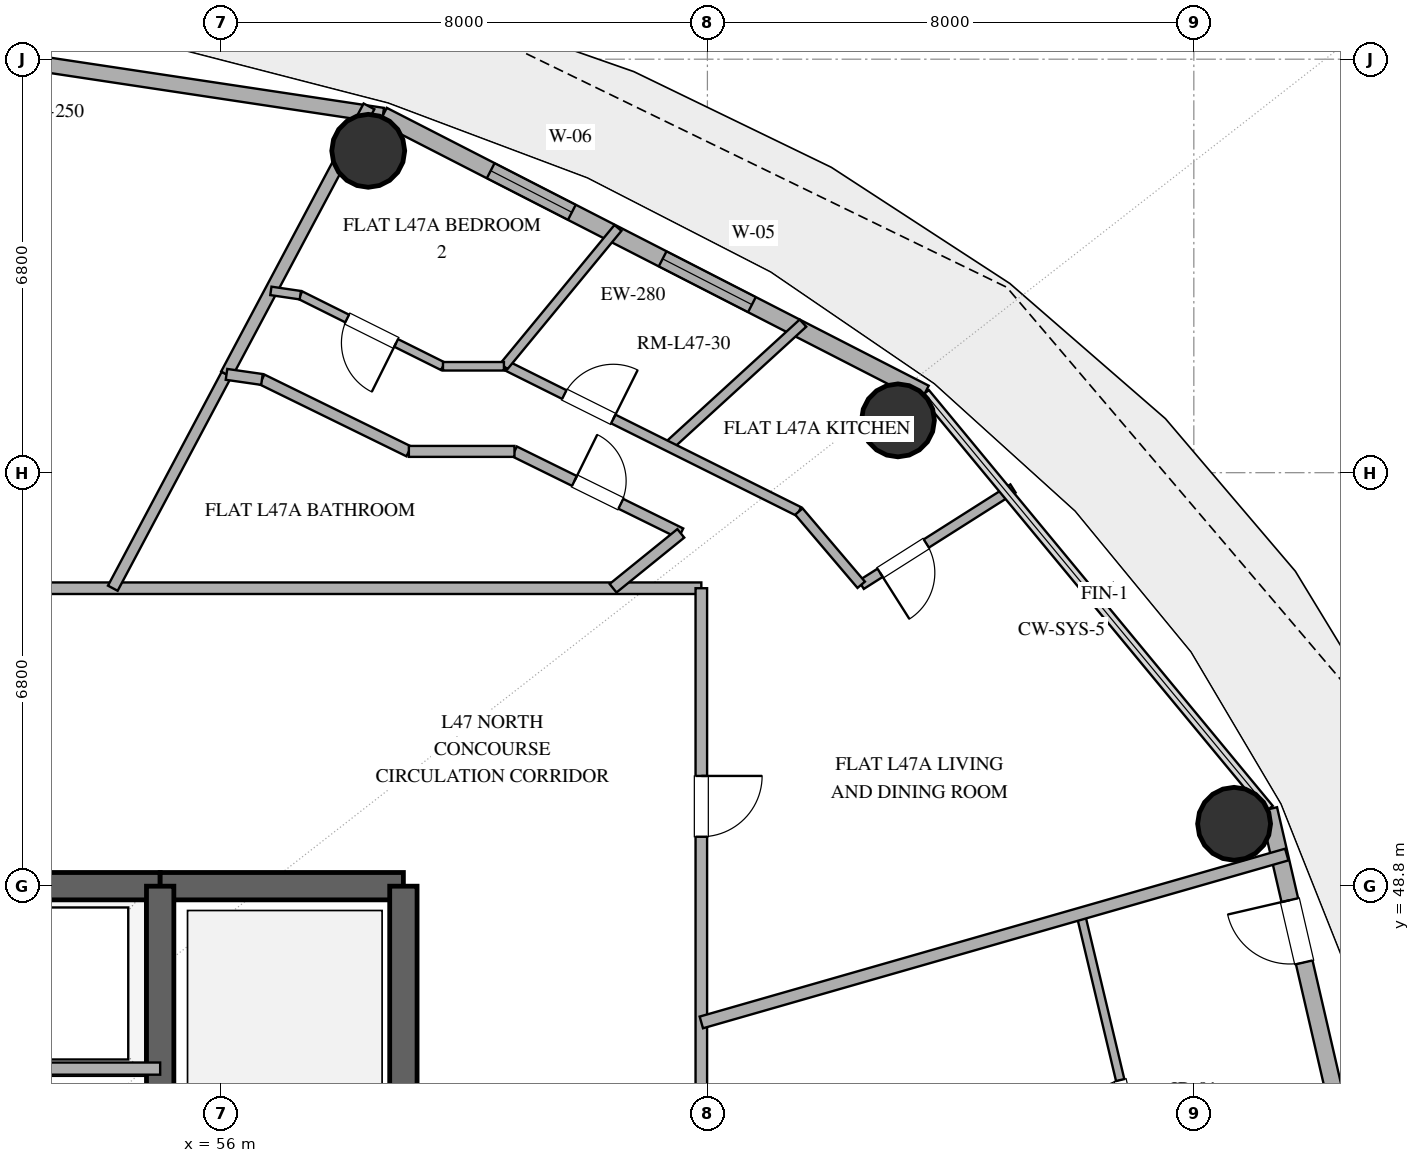
"""IFC4 building model, lengths in metres.
Left out: names, types, materials, properties, quantities, classifications, styles, units other than length and angle.
Written with IfcOpenShell. Run it as: python <this file> out.ifc"""

import sys

from ifc_helpers import new_model, si_unit, direction, frame, frame_2d, origin, origin_2d, place, context, subcontext, project, spatial, rectangle, hollow_circle, extrude, element, fill, save


model = new_model("IFC4")
c1 = context("Model", 3, precision=1e-05, world=origin(), true_north=direction((0.0, 1.0)))
c2 = subcontext(c1, "Body", "Model", "MODEL_VIEW")
j1 = project(units=[si_unit("LENGTHUNIT", "METRE"), si_unit("PLANEANGLEUNIT", "RADIAN")], contexts=[c1])
p1 = place(None, origin())
s1 = spatial("IfcSite", under=j1, at=p1, CompositionType="ELEMENT")
p2 = place(p1, origin())
s2 = spatial("IfcBuilding", under=s1, at=p2, CompositionType="ELEMENT")
p3 = place(p2, frame((0.0, 0.0, 186.6)))
s3 = spatial("IfcBuildingStorey", under=s2, at=p3, CompositionType="ELEMENT", Elevation=186.6)
p4 = place(p3, frame((41.0, 48.8, 0.0), z_axis=(0.0, 0.0, 1.0), x_axis=(1.0, 0.0, 0.0)))
e1 = element("IfcWall", 1, at=p4, inside=s3, PredefinedType="SHEAR", context=c2, shape_type="SweptSolid", body=[
    extrude(rectangle(XDim=14.0, YDim=0.45, at=frame_2d((7.0, 0.0))), origin(), (0.0, 0.0, 1.0), 3.38),
])
p5 = place(p4, frame((6.1, 0.0, 0.0)))
e2 = element("IfcOpeningElement", 2, at=p5, cuts=e1, PredefinedType="OPENING", context=c2, shape_type="SweptSolid", body=[
    extrude(rectangle(XDim=1.8, YDim=2.25, at=frame_2d((0.9, 1.125))), frame((0.0, 0.235, 0.0), z_axis=(0.0, -1.0, 0.0), x_axis=(1.0, 0.0, 0.0)), (0.0, 0.0, 1.0), 0.47),
])
p6 = place(p3, frame((55.0, 48.8, 0.0), z_axis=(0.0, 0.0, 1.0), x_axis=(1.0, 0.0, 0.0)))
e3 = element("IfcWall", 3, at=p6, inside=s3, PredefinedType="SHEAR", context=c2, shape_type="SweptSolid", body=[
    extrude(rectangle(XDim=4.0, YDim=0.45, at=frame_2d((2.0, 0.0))), origin(), (0.0, 0.0, 1.0), 3.38),
])
p7 = place(p3, frame((59.0, 35.2, 0.0), z_axis=(0.0, 0.0, 1.0), x_axis=(0.0, 1.0, 0.0)))
e4 = element("IfcWall", 4, at=p7, inside=s3, PredefinedType="SHEAR", context=c2, shape_type="SweptSolid", body=[
    extrude(rectangle(XDim=13.6, YDim=0.45, at=frame_2d((6.8, 0.0))), origin(), (0.0, 0.0, 1.0), 3.38),
])
p8 = place(p3, frame((55.0, 35.2, 0.0), z_axis=(0.0, 0.0, 1.0), x_axis=(0.0, 1.0, 0.0)))
e5 = element("IfcWall", 5, at=p8, inside=s3, PredefinedType="SHEAR", context=c2, shape_type="SweptSolid", body=[
    extrude(rectangle(XDim=13.6, YDim=0.45, at=frame_2d((6.8, 0.0))), origin(), (0.0, 0.0, 1.0), 3.38),
])
p9 = place(p8, frame((1.15, 0.0, 0.0)))
e6 = element("IfcOpeningElement", 6, at=p9, cuts=e5, PredefinedType="OPENING", context=c2, shape_type="SweptSolid", body=[
    extrude(rectangle(XDim=1.1, YDim=2.2, at=frame_2d((0.55, 1.1))), frame((0.0, 0.235, 0.0), z_axis=(0.0, -1.0, 0.0), x_axis=(1.0, 0.0, 0.0)), (0.0, 0.0, 1.0), 0.47),
])
for number, where, z_axis, x_axis in (
    (7, (72.662, 49.826, 0.0), (0.0, 0.0, 1.0), (1.0, 0.0, 0.0)),
    (8, (67.134, 56.46, 0.0), (0.0, 0.0, 1.0), (1.0, 0.0, 0.0)),
    (9, (58.422, 60.893, 0.0), (0.0, 0.0, 1.0), (1.0, 0.0, 0.0)),
):
    element("IfcColumn", number, at=place(p3, frame(where, z_axis=z_axis, x_axis=x_axis)), inside=s3, PredefinedType="COLUMN", context=c2, shape_type="SweptSolid", body=[
        extrude(hollow_circle(Radius=0.6, WallThickness=0.032, at=origin_2d()), origin(), (0.0, 0.0, 1.0), 3.38),
    ])
p10 = place(p3, frame((75.099, 42.0, 0.0), z_axis=(0.0, 0.0, 1.0), x_axis=(-0.225473184558, 0.974249374157, 0.0)))
e10 = element("IfcWall", 10, at=p10, inside=s3, PredefinedType="SOLIDWALL", context=c2, shape_type="SweptSolid", body=[
    extrude(rectangle(XDim=8.28, YDim=0.28, at=frame_2d((4.14, 0.0))), origin(), (0.0, 0.0, 1.0), 3.38),
])
p11 = place(p10, frame((5.694, 0.0, 0.0)))
e11 = element("IfcOpeningElement", 11, at=p11, cuts=e10, PredefinedType="OPENING", context=c2, shape_type="SweptSolid", body=[
    extrude(rectangle(XDim=1.05, YDim=2.2, at=frame_2d((0.525, 1.1))), frame((0.0, 0.15, 0.0), z_axis=(0.0, -1.0, 0.0), x_axis=(1.0, 0.0, 0.0)), (0.0, 0.0, 1.0), 0.3),
])
p12 = place(p3, frame((67.576, 56.906, 0.0), z_axis=(0.0, 0.0, 1.0), x_axis=(-0.889872523182, 0.456209263919, 0.0)))
e12 = element("IfcWall", 12, at=p12, inside=s3, PredefinedType="SOLIDWALL", context=c2, shape_type="SweptSolid", body=[
    extrude(rectangle(XDim=10.016, YDim=0.28, at=frame_2d((5.008, 0.0))), origin(), (0.0, 0.0, 1.0), 3.38),
])
p13 = place(p12, frame((3.196, 0.0, 0.85)))
e13 = element("IfcOpeningElement", 13, at=p13, cuts=e12, PredefinedType="OPENING", context=c2, shape_type="SweptSolid", body=[
    extrude(rectangle(XDim=1.65, YDim=2.0, at=frame_2d((0.825, 1.0))), frame((0.0, 0.15, 0.0), z_axis=(0.0, -1.0, 0.0), x_axis=(1.0, 0.0, 0.0)), (0.0, 0.0, 1.0), 0.3),
])
p14 = place(p12, frame((6.524, 0.0, 0.85)))
e14 = element("IfcOpeningElement", 14, at=p14, cuts=e12, PredefinedType="OPENING", context=c2, shape_type="SweptSolid", body=[
    extrude(rectangle(XDim=1.5, YDim=2.0, at=frame_2d((0.75, 1.0))), frame((0.0, 0.15, 0.0), z_axis=(0.0, -1.0, 0.0), x_axis=(1.0, 0.0, 0.0)), (0.0, 0.0, 1.0), 0.3),
])
p15 = place(p3, frame((58.663, 61.475, 0.0), z_axis=(0.0, 0.0, 1.0), x_axis=(-0.988863993413, 0.148822049884, 0.0)))
e15 = element("IfcWall", 15, at=p15, inside=s3, PredefinedType="SOLIDWALL", context=c2, shape_type="SweptSolid", body=[
    extrude(rectangle(XDim=10.783, YDim=0.25, at=frame_2d((5.392, 0.0))), origin(), (0.0, 0.0, 1.0), 3.38),
])
p16 = place(p3, frame((52.05, 45.8, 0.0), z_axis=(0.0, 0.0, 1.0), x_axis=(1.0, 0.0, 0.0)))
e16 = element("IfcWall", 16, at=p16, inside=s3, PredefinedType="SOLIDWALL", context=c2, shape_type="SweptSolid", body=[
    extrude(rectangle(XDim=2.95, YDim=0.2, at=frame_2d((1.475, 0.0))), origin(), (0.0, 0.0, 1.0), 2.74),
])
p17 = place(p3, frame((45.05, 53.7, 0.0), z_axis=(0.0, 0.0, 1.0), x_axis=(1.0, 0.0, 0.0)))
e17 = element("IfcWall", 17, at=p17, inside=s3, PredefinedType="PARTITIONING", context=c2, shape_type="SweptSolid", body=[
    extrude(rectangle(XDim=18.85, YDim=0.19, at=frame_2d((9.425, 0.0))), origin(), (0.0, 0.0, 1.0), 2.74),
])
p18 = place(p17, frame((4.104, 0.0, 0.0)))
e18 = element("IfcOpeningElement", 18, at=p18, cuts=e17, PredefinedType="OPENING", context=c2, shape_type="SweptSolid", body=[
    extrude(rectangle(XDim=1.0, YDim=2.2, at=frame_2d((0.5, 1.1))), frame((0.0, 0.105, 0.0), z_axis=(0.0, -1.0, 0.0), x_axis=(1.0, 0.0, 0.0)), (0.0, 0.0, 1.0), 0.21),
])
p19 = place(p3, frame((63.9, 53.7, 0.0), z_axis=(0.0, 0.0, 1.0), x_axis=(0.0, -1.0, 0.0)))
e19 = element("IfcWall", 19, at=p19, inside=s3, PredefinedType="PARTITIONING", context=c2, shape_type="SweptSolid", body=[
    extrude(rectangle(XDim=16.292, YDim=0.19, at=frame_2d((8.146, 0.0))), origin(), (0.0, 0.0, 1.0), 2.74),
])
p20 = place(p19, frame((3.087, 0.0, 0.0)))
e20 = element("IfcOpeningElement", 20, at=p20, cuts=e19, PredefinedType="OPENING", context=c2, shape_type="SweptSolid", body=[
    extrude(rectangle(XDim=1.0, YDim=2.2, at=frame_2d((0.5, 1.1))), frame((0.0, 0.105, 0.0), z_axis=(0.0, -1.0, 0.0), x_axis=(1.0, 0.0, 0.0)), (0.0, 0.0, 1.0), 0.21),
])
p21 = place(p3, frame((71.649, 42.0, 0.0), z_axis=(0.0, 0.0, 1.0), x_axis=(-0.231639074409, 0.972801798522, 0.0)))
e21 = element("IfcWall", 21, at=p21, inside=s3, PredefinedType="PARTITIONING", context=c2, shape_type="SweptSolid", body=[
    extrude(rectangle(XDim=6.525, YDim=0.14, at=frame_2d((3.263, 0.0))), origin(), (0.0, 0.0, 1.0), 2.74),
])
p22 = place(p21, frame((2.812, 0.0, 0.0)))
e22 = element("IfcOpeningElement", 22, at=p22, cuts=e21, PredefinedType="OPENING", context=c2, shape_type="SweptSolid", body=[
    extrude(rectangle(XDim=0.9, YDim=2.1, at=frame_2d((0.45, 1.05))), frame((0.0, 0.08, 0.0), z_axis=(0.0, -1.0, 0.0), x_axis=(1.0, 0.0, 0.0)), (0.0, 0.0, 1.0), 0.16),
])
p23 = place(p3, frame((73.528, 49.32, 0.0), z_axis=(0.0, 0.0, 1.0), x_axis=(-0.961265987417, -0.275622389211, 0.0)))
e23 = element("IfcWall", 23, at=p23, inside=s3, PredefinedType="PARTITIONING", context=c2, shape_type="SweptSolid", body=[
    extrude(rectangle(XDim=10.016, YDim=0.2, at=frame_2d((5.008, 0.0))), origin(), (0.0, 0.0, 1.0), 2.74),
])
p24 = place(p3, frame((54.221, 53.7, 0.0), z_axis=(0.0, 0.0, 1.0), x_axis=(0.469480828888, 0.882942665922, 0.0)))
e24 = element("IfcWall", 24, at=p24, inside=s3, PredefinedType="PLUMBINGWALL", context=c2, shape_type="SweptSolid", body=[
    extrude(rectangle(XDim=3.983, YDim=0.18, at=frame_2d((1.992, 0.0))), origin(), (0.0, 0.0, 1.0), 2.74),
])
p25 = place(p3, frame((56.091, 57.217, 0.0), z_axis=(0.0, 0.0, 1.0), x_axis=(0.469455598571, 0.882956080997, 0.0)))
e25 = element("IfcWall", 25, at=p25, inside=s3, PredefinedType="PARTITIONING", context=c2, shape_type="SweptSolid", body=[
    extrude(rectangle(XDim=4.991, YDim=0.2, at=frame_2d((2.496, 0.0))), origin(), (0.0, 0.0, 1.0), 2.74),
])
p26 = place(p3, frame((60.827, 55.95, 0.0), z_axis=(0.0, 0.0, 1.0), x_axis=(0.897069141595, -0.441890207175, 0.0)))
e26 = element("IfcWall", 26, at=p26, inside=s3, PredefinedType="PLUMBINGWALL", context=c2, shape_type="SweptSolid", body=[
    extrude(rectangle(XDim=3.05, YDim=0.18, at=frame_2d((1.525, 0.0))), origin(), (0.0, 0.0, 1.0), 2.74),
])
p27 = place(p26, frame((1.1, 0.0, 0.0)))
e27 = element("IfcOpeningElement", 27, at=p27, cuts=e26, PredefinedType="OPENING", context=c2, shape_type="SweptSolid", body=[
    extrude(rectangle(XDim=0.85, YDim=2.1, at=frame_2d((0.425, 1.05))), frame((0.0, 0.1, 0.0), z_axis=(0.0, -1.0, 0.0), x_axis=(1.0, 0.0, 0.0)), (0.0, 0.0, 1.0), 0.2),
])
p28 = place(p3, frame((63.354, 56.033, 0.0), z_axis=(0.0, 0.0, 1.0), x_axis=(0.738168713693, 0.674616150211, 0.0)))
e28 = element("IfcWall", 28, at=p28, inside=s3, PredefinedType="PLUMBINGWALL", context=c2, shape_type="SweptSolid", body=[
    extrude(rectangle(XDim=3.004, YDim=0.16, at=frame_2d((1.502, 0.0))), origin(), (0.0, 0.0, 1.0), 2.74),
])
p29 = place(p3, frame((60.713, 57.35, 0.0), z_axis=(0.0, 0.0, 1.0), x_axis=(0.894937323042, -0.44619187333, 0.0)))
e29 = element("IfcWall", 29, at=p29, inside=s3, PredefinedType="PLUMBINGWALL", context=c2, shape_type="SweptSolid", body=[
    extrude(rectangle(XDim=5.354, YDim=0.16, at=frame_2d((2.677, 0.0))), origin(), (0.0, 0.0, 1.0), 2.74),
])
p30 = place(p29, frame((1.043, 0.0, 0.0)))
e30 = element("IfcOpeningElement", 30, at=p30, cuts=e29, PredefinedType="OPENING", context=c2, shape_type="SweptSolid", body=[
    extrude(rectangle(XDim=0.9, YDim=2.1, at=frame_2d((0.45, 1.05))), frame((0.0, 0.09, 0.0), z_axis=(0.0, -1.0, 0.0), x_axis=(1.0, 0.0, 0.0)), (0.0, 0.0, 1.0), 0.18),
])
p31 = place(p3, frame((69.026, 55.34, 0.0), z_axis=(0.0, 0.0, 1.0), x_axis=(-0.844378276983, -0.5357474455, 0.0)))
e31 = element("IfcWall", 31, at=p31, inside=s3, PredefinedType="PLUMBINGWALL", context=c2, shape_type="SweptSolid", body=[
    extrude(rectangle(XDim=2.956, YDim=0.16, at=frame_2d((1.478, 0.0))), origin(), (0.0, 0.0, 1.0), 2.74),
])
p32 = place(p31, frame((1.688, 0.0, 0.0)))
e32 = element("IfcOpeningElement", 32, at=p32, cuts=e31, PredefinedType="OPENING", context=c2, shape_type="SweptSolid", body=[
    extrude(rectangle(XDim=0.9, YDim=2.1, at=frame_2d((0.45, 1.05))), frame((0.0, 0.09, 0.0), z_axis=(0.0, -1.0, 0.0), x_axis=(1.0, 0.0, 0.0)), (0.0, 0.0, 1.0), 0.18),
])
p33 = place(p3, frame((62.529, 59.625, 0.0), z_axis=(0.0, 0.0, 1.0), x_axis=(-0.63607001361, -0.771631348369, 0.0)))
e33 = element("IfcWall", 33, at=p33, inside=s3, PredefinedType="PARTITIONING", context=c2, shape_type="SweptSolid", body=[
    extrude(rectangle(XDim=2.948, YDim=0.15, at=frame_2d((1.474, 0.0))), origin(), (0.0, 0.0, 1.0), 2.74),
])
p34 = place(p3, frame((56.674, 57.133, 0.0), z_axis=(0.0, 0.0, 1.0), x_axis=(0.898063439596, -0.439865955105, 0.0)))
e34 = element("IfcWall", 34, at=p34, inside=s3, PredefinedType="PLUMBINGWALL", context=c2, shape_type="SweptSolid", body=[
    extrude(rectangle(XDim=2.69, YDim=0.18, at=frame_2d((1.345, 0.0))), origin(), (0.0, 0.0, 1.0), 2.74),
])
p35 = place(p3, frame((59.651, 57.35, 0.0), z_axis=(0.0, 0.0, 1.0), x_axis=(-0.895041110332, 0.445983644112, 0.0)))
e35 = element("IfcWall", 35, at=p35, inside=s3, PredefinedType="PARTITIONING", context=c2, shape_type="SweptSolid", body=[
    extrude(rectangle(XDim=2.621, YDim=0.14, at=frame_2d((1.311, 0.0))), origin(), (0.0, 0.0, 1.0), 2.74),
])
p36 = place(p35, frame((0.861, 0.0, 0.0)))
e36 = element("IfcOpeningElement", 36, at=p36, cuts=e35, PredefinedType="OPENING", context=c2, shape_type="SweptSolid", body=[
    extrude(rectangle(XDim=0.9, YDim=2.1, at=frame_2d((0.45, 1.05))), frame((0.0, 0.08, 0.0), z_axis=(0.0, -1.0, 0.0), x_axis=(1.0, 0.0, 0.0)), (0.0, 0.0, 1.0), 0.16),
])
p37 = place(p3, frame((59.09, 55.95, 0.0), z_axis=(0.0, 0.0, 1.0), x_axis=(1.0, 0.0, 0.0)))
e37 = element("IfcWall", 37, at=p37, inside=s3, PredefinedType="PLUMBINGWALL", context=c2, shape_type="SweptSolid", body=[
    extrude(rectangle(XDim=1.737, YDim=0.18, at=frame_2d((0.868, 0.0))), origin(), (0.0, 0.0, 1.0), 2.74),
])
p38 = place(p3, frame((66.53, 53.756, 0.0), z_axis=(0.0, 0.0, 1.0), x_axis=(-0.647850029113, 0.76176790414, 0.0)))
e38 = element("IfcWall", 38, at=p38, inside=s3, PredefinedType="PLUMBINGWALL", context=c2, shape_type="SweptSolid", body=[
    extrude(rectangle(XDim=1.582, YDim=0.16, at=frame_2d((0.791, 0.0))), origin(), (0.0, 0.0, 1.0), 2.74),
])
p39 = place(p3, frame((63.563, 54.602, 0.0), z_axis=(0.0, 0.0, 1.0), x_axis=(-0.777201256293, -0.62925210148, 0.0)))
e39 = element("IfcWall", 39, at=p39, inside=s3, PredefinedType="PLUMBINGWALL", context=c2, shape_type="SweptSolid", body=[
    extrude(rectangle(XDim=1.434, YDim=0.18, at=frame_2d((0.717, 0.0))), origin(), (0.0, 0.0, 1.0), 2.74),
])
p40 = place(p3, frame((60.654, 57.35, 0.0), z_axis=(0.0, 0.0, 1.0), x_axis=(-1.0, 0.0, 0.0)))
e40 = element("IfcWall", 40, at=p40, inside=s3, PredefinedType="PARTITIONING", context=c2, shape_type="SweptSolid", body=[
    extrude(rectangle(XDim=1.002, YDim=0.14, at=frame_2d((0.501, 0.0))), origin(), (0.0, 0.0, 1.0), 2.74),
])
p41 = place(p3, frame((56.091, 57.217, 0.0), z_axis=(0.0, 0.0, 1.0), x_axis=(0.989841434531, -0.142175716936, 0.0)))
e41 = element("IfcWall", 41, at=p41, inside=s3, PredefinedType="PLUMBINGWALL", context=c2, shape_type="SweptSolid", body=[
    extrude(rectangle(XDim=0.589, YDim=0.18, at=frame_2d((0.294, 0.0))), origin(), (0.0, 0.0, 1.0), 2.74),
])
p42 = place(p3, frame((57.305, 58.519, 0.0), z_axis=(0.0, 0.0, 1.0), x_axis=(-0.989485449351, 0.144632449754, 0.0)))
e42 = element("IfcWall", 42, at=p42, inside=s3, PredefinedType="PARTITIONING", context=c2, shape_type="SweptSolid", body=[
    extrude(rectangle(XDim=0.49, YDim=0.14, at=frame_2d((0.245, 0.0))), origin(), (0.0, 0.0, 1.0), 2.74),
])
p43 = place(p11, origin())
e43 = element("IfcDoor", 43, at=p43, inside=s3, OperationType="SINGLE_SWING_RIGHT", PredefinedType="DOOR", context=c2, shape_type="SweptSolid", body=[
    extrude(rectangle(XDim=1.05, YDim=2.2, at=frame_2d((0.525, 1.1))), frame((0.0, 0.025, 0.0), z_axis=(0.0, -1.0, 0.0), x_axis=(1.0, 0.0, 0.0)), (0.0, 0.0, 1.0), 0.05),
])
fill(e11, e43)
p44 = place(p13, origin())
e44 = element("IfcWindow", 44, at=p44, inside=s3, PartitioningType="SINGLE_PANEL", PredefinedType="WINDOW", context=c2, shape_type="SweptSolid", body=[
    extrude(rectangle(XDim=1.65, YDim=2.0, at=frame_2d((0.825, 1.0))), frame((0.0, 0.03, 0.0), z_axis=(0.0, -1.0, 0.0), x_axis=(1.0, 0.0, 0.0)), (0.0, 0.0, 1.0), 0.06),
])
fill(e13, e44)
p45 = place(p14, origin())
e45 = element("IfcWindow", 45, at=p45, inside=s3, PartitioningType="SINGLE_PANEL", PredefinedType="WINDOW", context=c2, shape_type="SweptSolid", body=[
    extrude(rectangle(XDim=1.5, YDim=2.0, at=frame_2d((0.75, 1.0))), frame((0.0, 0.03, 0.0), z_axis=(0.0, -1.0, 0.0), x_axis=(1.0, 0.0, 0.0)), (0.0, 0.0, 1.0), 0.06),
])
fill(e14, e45)
p46 = place(p20, origin())
e46 = element("IfcDoor", 46, at=p46, inside=s3, OperationType="SINGLE_SWING_LEFT", PredefinedType="DOOR", context=c2, shape_type="SweptSolid", body=[
    extrude(rectangle(XDim=1.0, YDim=2.2, at=frame_2d((0.5, 1.1))), frame((0.0, 0.025, 0.0), z_axis=(0.0, -1.0, 0.0), x_axis=(1.0, 0.0, 0.0)), (0.0, 0.0, 1.0), 0.05),
])
fill(e20, e46)
p47 = place(p22, origin())
e47 = element("IfcDoor", 47, at=p47, inside=s3, OperationType="SINGLE_SWING_LEFT", PredefinedType="DOOR", context=c2, shape_type="SweptSolid", body=[
    extrude(rectangle(XDim=0.9, YDim=2.1, at=frame_2d((0.45, 1.05))), frame((0.0, 0.025, 0.0), z_axis=(0.0, -1.0, 0.0), x_axis=(1.0, 0.0, 0.0)), (0.0, 0.0, 1.0), 0.05),
])
fill(e22, e47)
p48 = place(p27, origin())
e48 = element("IfcDoor", 48, at=p48, inside=s3, OperationType="SINGLE_SWING_LEFT", PredefinedType="DOOR", context=c2, shape_type="SweptSolid", body=[
    extrude(rectangle(XDim=0.85, YDim=2.1, at=frame_2d((0.425, 1.05))), frame((0.0, 0.025, 0.0), z_axis=(0.0, -1.0, 0.0), x_axis=(1.0, 0.0, 0.0)), (0.0, 0.0, 1.0), 0.05),
])
fill(e27, e48)
p49 = place(p30, origin())
e49 = element("IfcDoor", 49, at=p49, inside=s3, OperationType="SINGLE_SWING_RIGHT", PredefinedType="DOOR", context=c2, shape_type="SweptSolid", body=[
    extrude(rectangle(XDim=0.9, YDim=2.1, at=frame_2d((0.45, 1.05))), frame((0.0, 0.025, 0.0), z_axis=(0.0, -1.0, 0.0), x_axis=(1.0, 0.0, 0.0)), (0.0, 0.0, 1.0), 0.05),
])
fill(e30, e49)
p50 = place(p32, origin())
e50 = element("IfcDoor", 50, at=p50, inside=s3, OperationType="SINGLE_SWING_RIGHT", PredefinedType="DOOR", context=c2, shape_type="SweptSolid", body=[
    extrude(rectangle(XDim=0.9, YDim=2.1, at=frame_2d((0.45, 1.05))), frame((0.0, 0.025, 0.0), z_axis=(0.0, -1.0, 0.0), x_axis=(1.0, 0.0, 0.0)), (0.0, 0.0, 1.0), 0.05),
])
fill(e32, e50)
p51 = place(p36, origin())
e51 = element("IfcDoor", 51, at=p51, inside=s3, OperationType="SINGLE_SWING_LEFT", PredefinedType="DOOR", context=c2, shape_type="SweptSolid", body=[
    extrude(rectangle(XDim=0.9, YDim=2.1, at=frame_2d((0.45, 1.05))), frame((0.0, 0.025, 0.0), z_axis=(0.0, -1.0, 0.0), x_axis=(1.0, 0.0, 0.0)), (0.0, 0.0, 1.0), 0.05),
])
fill(e36, e51)
save(model, sys.argv[1])
